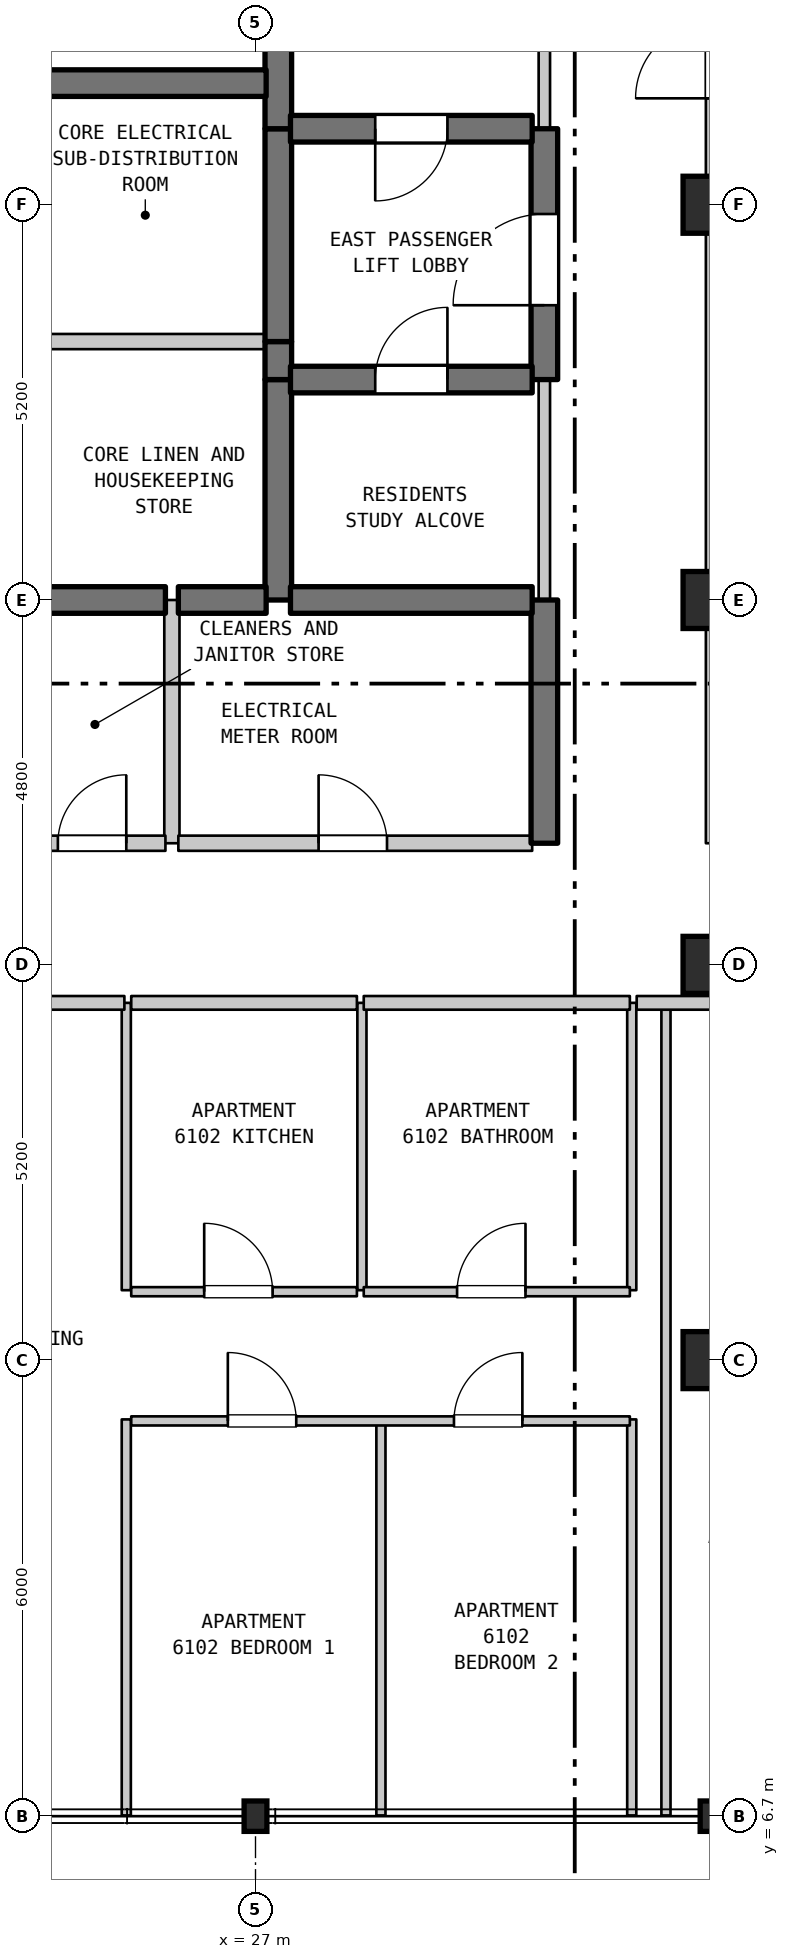
"""IFC4 building model, lengths in metres.
Left out: names, types, materials, properties, quantities, classifications, styles, units other than length and angle.
Written with IfcOpenShell. Run it as: python <this file> out.ifc"""

import sys

from ifc_helpers import new_model, si_unit, direction, frame, frame_2d, origin, origin_2d, place, context, subcontext, project, spatial, rectangle, i_section, extrude, element, fill, save


model = new_model("IFC4")
c1 = context("Model", 3, precision=1e-05, world=origin(), true_north=direction((0.0, 1.0)))
c2 = subcontext(c1, "Body", "Model", "MODEL_VIEW")
j1 = project(units=[si_unit("LENGTHUNIT", "METRE"), si_unit("PLANEANGLEUNIT", "RADIAN")], contexts=[c1])
p1 = place(None, origin())
s1 = spatial("IfcSite", under=j1, at=p1, CompositionType="ELEMENT")
p2 = place(p1, origin())
s2 = spatial("IfcBuilding", under=s1, at=p2, CompositionType="ELEMENT")
p3 = place(p2, frame((0.0, 0.0, 247.3)))
s3 = spatial("IfcBuildingStorey", under=s2, at=p3, CompositionType="ELEMENT", Elevation=247.3)
for number, where, z_axis, x_axis in (
    (1, (27.0, 6.7, 0.0), (0.0, 0.0, 1.0), (1.0, 0.0, 0.0)),
    (2, (33.0, 6.7, 0.0), (0.0, 0.0, 1.0), (1.0, 0.0, 0.0)),
):
    element("IfcColumn", number, at=place(p3, frame(where, z_axis=z_axis, x_axis=x_axis)), inside=s3, PredefinedType="COLUMN", context=c2, shape_type="SweptSolid", body=[
        extrude(i_section(OverallWidth=0.3, OverallDepth=0.4, WebThickness=0.013, FlangeThickness=0.024, FilletRadius=0.027, at=origin_2d()), origin(), (0.0, 0.0, 1.0), 3.7),
    ])
for number, where, z_axis, x_axis in (
    (3, (33.0, 12.7, 0.0), (0.0, 0.0, 1.0), (1.0, 0.0, 0.0)),
    (4, (33.0, 17.9, 0.0), (0.0, 0.0, 1.0), (1.0, 0.0, 0.0)),
    (5, (33.0, 22.7, 0.0), (0.0, 0.0, 1.0), (1.0, 0.0, 0.0)),
    (6, (33.0, 27.9, 0.0), (0.0, 0.0, 1.0), (1.0, 0.0, 0.0)),
):
    element("IfcColumn", number, at=place(p3, frame(where, z_axis=z_axis, x_axis=x_axis)), inside=s3, PredefinedType="COLUMN", context=c2, shape_type="SweptSolid", body=[
        extrude(rectangle(XDim=0.75, YDim=0.75, at=origin_2d()), origin(), (0.0, 0.0, 1.0), 3.7),
    ])
p4 = place(p3, frame((25.3, 6.71, 0.0), z_axis=(0.0, 0.0, 1.0), x_axis=(0.0, 1.0, 0.0)))
e7 = element("IfcWall", 7, at=p4, inside=s3, PredefinedType="PARTITIONING", context=c2, shape_type="SweptSolid", body=[
    extrude(rectangle(XDim=5.21, YDim=0.12, at=frame_2d((2.605, 0.0))), origin(), (0.0, 0.0, 1.0), 3.39),
])
p5 = place(p3, frame((25.3, 13.62, 0.0), z_axis=(0.0, 0.0, 1.0), x_axis=(0.0, 1.0, 0.0)))
e8 = element("IfcWall", 8, at=p5, inside=s3, PredefinedType="PARTITIONING", context=c2, shape_type="SweptSolid", body=[
    extrude(rectangle(XDim=3.78, YDim=0.12, at=frame_2d((1.89, 0.0))), origin(), (0.0, 0.0, 1.0), 3.39),
])
p6 = place(p3, frame((25.9, 19.5, 0.0), z_axis=(0.0, 0.0, 1.0), x_axis=(0.0, 1.0, 0.0)))
e9 = element("IfcWall", 9, at=p6, inside=s3, PredefinedType="STANDARD", context=c2, shape_type="SweptSolid", body=[
    extrude(rectangle(XDim=3.2, YDim=0.2, at=frame_2d((1.6, 0.0))), origin(), (0.0, 0.0, 1.0), 3.39),
])
p7 = place(p3, frame((27.3, 22.7, 0.0), z_axis=(0.0, 0.0, 1.0), x_axis=(0.0, 1.0, 0.0)))
e10 = element("IfcWall", 10, at=p7, inside=s3, PredefinedType="SHEAR", context=c2, shape_type="SweptSolid", body=[
    extrude(rectangle(XDim=2.9, YDim=0.35, at=frame_2d((1.45, 0.0))), origin(), (0.0, 0.0, 1.0), 3.39),
])
p8 = place(p3, frame((27.3, 25.6, 0.0), z_axis=(0.0, 0.0, 1.0), x_axis=(0.0, 1.0, 0.0)))
e11 = element("IfcWall", 11, at=p8, inside=s3, PredefinedType="SHEAR", context=c2, shape_type="SweptSolid", body=[
    extrude(rectangle(XDim=0.5, YDim=0.35, at=frame_2d((0.25, 0.0))), origin(), (0.0, 0.0, 1.0), 3.39),
])
p9 = place(p3, frame((27.3, 26.1, 0.0), z_axis=(0.0, 0.0, 1.0), x_axis=(0.0, 1.0, 0.0)))
e12 = element("IfcWall", 12, at=p9, inside=s3, PredefinedType="SHEAR", context=c2, shape_type="SweptSolid", body=[
    extrude(rectangle(XDim=2.8, YDim=0.35, at=frame_2d((1.4, 0.0))), origin(), (0.0, 0.0, 1.0), 3.39),
])
p10 = place(p3, frame((27.3, 28.9, 0.0), z_axis=(0.0, 0.0, 1.0), x_axis=(0.0, 1.0, 0.0)))
e13 = element("IfcWall", 13, at=p10, inside=s3, PredefinedType="SHEAR", context=c2, shape_type="SweptSolid", body=[
    extrude(rectangle(XDim=2.6, YDim=0.35, at=frame_2d((1.3, 0.0))), origin(), (0.0, 0.0, 1.0), 3.39),
])
p11 = place(p3, frame((28.4, 13.62, 0.0), z_axis=(0.0, 0.0, 1.0), x_axis=(0.0, 1.0, 0.0)))
e14 = element("IfcWall", 14, at=p11, inside=s3, PredefinedType="PARTITIONING", context=c2, shape_type="SweptSolid", body=[
    extrude(rectangle(XDim=3.78, YDim=0.12, at=frame_2d((1.89, 0.0))), origin(), (0.0, 0.0, 1.0), 3.39),
])
p12 = place(p3, frame((28.65, 6.71, 0.0), z_axis=(0.0, 0.0, 1.0), x_axis=(0.0, 1.0, 0.0)))
e15 = element("IfcWall", 15, at=p12, inside=s3, PredefinedType="PARTITIONING", context=c2, shape_type="SweptSolid", body=[
    extrude(rectangle(XDim=5.21, YDim=0.12, at=frame_2d((2.605, 0.0))), origin(), (0.0, 0.0, 1.0), 3.39),
])
p13 = place(p3, frame((30.8, 19.5, 0.0), z_axis=(0.0, 0.0, 1.0), x_axis=(0.0, 1.0, 0.0)))
e16 = element("IfcWall", 16, at=p13, inside=s3, PredefinedType="SHEAR", context=c2, shape_type="SweptSolid", body=[
    extrude(rectangle(XDim=3.2, YDim=0.35, at=frame_2d((1.6, 0.0))), origin(), (0.0, 0.0, 1.0), 3.39),
])
p14 = place(p3, frame((30.8, 22.7, 0.0), z_axis=(0.0, 0.0, 1.0), x_axis=(0.0, 1.0, 0.0)))
e17 = element("IfcWall", 17, at=p14, inside=s3, PredefinedType="STANDARD", context=c2, shape_type="SweptSolid", body=[
    extrude(rectangle(XDim=2.9, YDim=0.15, at=frame_2d((1.45, 0.0))), origin(), (0.0, 0.0, 1.0), 3.39),
])
p15 = place(p3, frame((30.8, 25.6, 0.0), z_axis=(0.0, 0.0, 1.0), x_axis=(0.0, 1.0, 0.0)))
e18 = element("IfcWall", 18, at=p15, inside=s3, PredefinedType="SHEAR", context=c2, shape_type="SweptSolid", body=[
    extrude(rectangle(XDim=3.3, YDim=0.35, at=frame_2d((1.65, 0.0))), origin(), (0.0, 0.0, 1.0), 3.39),
])
p16 = place(p15, frame((0.978, 0.0, 0.0)))
e19 = element("IfcOpeningElement", 19, at=p16, cuts=e18, PredefinedType="OPENING", context=c2, shape_type="SweptSolid", body=[
    extrude(rectangle(XDim=1.2, YDim=2.2, at=frame_2d((0.6, 1.1))), frame((0.0, 0.185, 0.0), z_axis=(0.0, -1.0, 0.0), x_axis=(1.0, 0.0, 0.0)), (0.0, 0.0, 1.0), 0.37),
])
p17 = place(p3, frame((30.8, 28.9, 0.0), z_axis=(0.0, 0.0, 1.0), x_axis=(0.0, 1.0, 0.0)))
e20 = element("IfcWall", 20, at=p17, inside=s3, PredefinedType="STANDARD", context=c2, shape_type="SweptSolid", body=[
    extrude(rectangle(XDim=2.6, YDim=0.15, at=frame_2d((1.3, 0.0))), origin(), (0.0, 0.0, 1.0), 3.39),
])
p18 = place(p3, frame((31.95, 6.71, 0.0), z_axis=(0.0, 0.0, 1.0), x_axis=(0.0, 1.0, 0.0)))
e21 = element("IfcWall", 21, at=p18, inside=s3, PredefinedType="PARTITIONING", context=c2, shape_type="SweptSolid", body=[
    extrude(rectangle(XDim=5.21, YDim=0.12, at=frame_2d((2.605, 0.0))), origin(), (0.0, 0.0, 1.0), 3.39),
])
p19 = place(p3, frame((31.95, 13.62, 0.0), z_axis=(0.0, 0.0, 1.0), x_axis=(0.0, 1.0, 0.0)))
e22 = element("IfcWall", 22, at=p19, inside=s3, PredefinedType="PARTITIONING", context=c2, shape_type="SweptSolid", body=[
    extrude(rectangle(XDim=3.78, YDim=0.12, at=frame_2d((1.89, 0.0))), origin(), (0.0, 0.0, 1.0), 3.39),
])
p20 = place(p3, frame((32.4, 6.71, 0.0), z_axis=(0.0, 0.0, 1.0), x_axis=(0.0, 1.0, 0.0)))
e23 = element("IfcWall", 23, at=p20, inside=s3, PredefinedType="PARTITIONING", context=c2, shape_type="SweptSolid", body=[
    extrude(rectangle(XDim=10.69, YDim=0.12, at=frame_2d((5.345, 0.0))), origin(), (0.0, 0.0, 1.0), 3.39),
])
p21 = place(p3, frame((33.0, 19.5, 0.0), z_axis=(0.0, 0.0, 1.0), x_axis=(0.0, 1.0, 0.0)))
e24 = element("IfcWall", 24, at=p21, inside=s3, PredefinedType="STANDARD", context=c2, shape_type="SweptSolid", body=[
    extrude(rectangle(XDim=8.4, YDim=0.15, at=frame_2d((4.2, 0.0))), origin(), (0.0, 0.0, 1.0), 3.1),
])
p22 = place(p3, frame((25.365, 11.9, 0.0), z_axis=(0.0, 0.0, 1.0), x_axis=(1.0, 0.0, 0.0)))
e25 = element("IfcWall", 25, at=p22, inside=s3, PredefinedType="PARTITIONING", context=c2, shape_type="SweptSolid", body=[
    extrude(rectangle(XDim=6.56, YDim=0.12, at=frame_2d((3.28, 0.0))), origin(), (0.0, 0.0, 1.0), 3.39),
])
p23 = place(p22, frame((1.271, 0.0, 0.0)))
e26 = element("IfcOpeningElement", 26, at=p23, cuts=e25, PredefinedType="OPENING", context=c2, shape_type="SweptSolid", body=[
    extrude(rectangle(XDim=0.9, YDim=2.15, at=frame_2d((0.45, 1.075))), frame((0.0, 0.07, 0.0), z_axis=(0.0, -1.0, 0.0), x_axis=(1.0, 0.0, 0.0)), (0.0, 0.0, 1.0), 0.14),
])
p24 = place(p22, frame((4.246, 0.0, 0.0)))
e27 = element("IfcOpeningElement", 27, at=p24, cuts=e25, PredefinedType="OPENING", context=c2, shape_type="SweptSolid", body=[
    extrude(rectangle(XDim=0.9, YDim=2.15, at=frame_2d((0.45, 1.075))), frame((0.0, 0.07, 0.0), z_axis=(0.0, -1.0, 0.0), x_axis=(1.0, 0.0, 0.0)), (0.0, 0.0, 1.0), 0.14),
])
p25 = place(p3, frame((25.365, 13.6, 0.0), z_axis=(0.0, 0.0, 1.0), x_axis=(1.0, 0.0, 0.0)))
e28 = element("IfcWall", 28, at=p25, inside=s3, PredefinedType="PARTITIONING", context=c2, shape_type="SweptSolid", body=[
    extrude(rectangle(XDim=2.969, YDim=0.12, at=frame_2d((1.484, 0.0))), origin(), (0.0, 0.0, 1.0), 3.39),
])
p26 = place(p25, frame((0.96, 0.0, 0.0)))
e29 = element("IfcOpeningElement", 29, at=p26, cuts=e28, PredefinedType="OPENING", context=c2, shape_type="SweptSolid", body=[
    extrude(rectangle(XDim=0.9, YDim=2.15, at=frame_2d((0.45, 1.075))), frame((0.0, 0.07, 0.0), z_axis=(0.0, -1.0, 0.0), x_axis=(1.0, 0.0, 0.0)), (0.0, 0.0, 1.0), 0.14),
])
p27 = place(p3, frame((28.424, 13.6, 0.0), z_axis=(0.0, 0.0, 1.0), x_axis=(1.0, 0.0, 0.0)))
e30 = element("IfcWall", 30, at=p27, inside=s3, PredefinedType="PARTITIONING", context=c2, shape_type="SweptSolid", body=[
    extrude(rectangle(XDim=3.501, YDim=0.12, at=frame_2d((1.75, 0.0))), origin(), (0.0, 0.0, 1.0), 3.39),
])
p28 = place(p27, frame((1.228, 0.0, 0.0)))
e31 = element("IfcOpeningElement", 31, at=p28, cuts=e30, PredefinedType="OPENING", context=c2, shape_type="SweptSolid", body=[
    extrude(rectangle(XDim=0.9, YDim=2.1, at=frame_2d((0.45, 1.05))), frame((0.0, 0.07, 0.0), z_axis=(0.0, -1.0, 0.0), x_axis=(1.0, 0.0, 0.0)), (0.0, 0.0, 1.0), 0.14),
])
p29 = place(p3, frame((20.855, 17.4, 0.0), z_axis=(0.0, 0.0, 1.0), x_axis=(1.0, 0.0, 0.0)))
e32 = element("IfcWall", 32, at=p29, inside=s3, PredefinedType="STANDARD", context=c2, shape_type="SweptSolid", body=[
    extrude(rectangle(XDim=4.42, YDim=0.18, at=frame_2d((2.21, 0.0))), origin(), (0.0, 0.0, 1.0), 3.39),
])
p30 = place(p29, frame((1.638, 0.0, 0.0)))
e33 = element("IfcOpeningElement", 33, at=p30, cuts=e32, PredefinedType="OPENING", context=c2, shape_type="SweptSolid", body=[
    extrude(rectangle(XDim=1.0, YDim=2.15, at=frame_2d((0.5, 1.075))), frame((0.0, 0.1, 0.0), z_axis=(0.0, -1.0, 0.0), x_axis=(1.0, 0.0, 0.0)), (0.0, 0.0, 1.0), 0.2),
])
p31 = place(p3, frame((25.365, 17.4, 0.0), z_axis=(0.0, 0.0, 1.0), x_axis=(1.0, 0.0, 0.0)))
e34 = element("IfcWall", 34, at=p31, inside=s3, PredefinedType="STANDARD", context=c2, shape_type="SweptSolid", body=[
    extrude(rectangle(XDim=2.969, YDim=0.18, at=frame_2d((1.484, 0.0))), origin(), (0.0, 0.0, 1.0), 3.39),
])
p32 = place(p3, frame((28.424, 17.4, 0.0), z_axis=(0.0, 0.0, 1.0), x_axis=(1.0, 0.0, 0.0)))
e35 = element("IfcWall", 35, at=p32, inside=s3, PredefinedType="STANDARD", context=c2, shape_type="SweptSolid", body=[
    extrude(rectangle(XDim=3.501, YDim=0.18, at=frame_2d((1.75, 0.0))), origin(), (0.0, 0.0, 1.0), 3.39),
])
p33 = place(p3, frame((32.015, 17.4, 0.0), z_axis=(0.0, 0.0, 1.0), x_axis=(1.0, 0.0, 0.0)))
e36 = element("IfcWall", 36, at=p33, inside=s3, PredefinedType="STANDARD", context=c2, shape_type="SweptSolid", body=[
    extrude(rectangle(XDim=4.64, YDim=0.18, at=frame_2d((2.32, 0.0))), origin(), (0.0, 0.0, 1.0), 3.39),
])
p34 = place(p33, frame((2.02, 0.0, 0.0)))
e37 = element("IfcOpeningElement", 37, at=p34, cuts=e36, PredefinedType="OPENING", context=c2, shape_type="SweptSolid", body=[
    extrude(rectangle(XDim=1.0, YDim=2.15, at=frame_2d((0.5, 1.075))), frame((0.0, 0.1, 0.0), z_axis=(0.0, -1.0, 0.0), x_axis=(1.0, 0.0, 0.0)), (0.0, 0.0, 1.0), 0.2),
])
p35 = place(p3, frame((23.96, 19.5, 0.0), z_axis=(0.0, 0.0, 1.0), x_axis=(1.0, 0.0, 0.0)))
e38 = element("IfcWall", 38, at=p35, inside=s3, PredefinedType="STANDARD", context=c2, shape_type="SweptSolid", body=[
    extrude(rectangle(XDim=1.855, YDim=0.2, at=frame_2d((0.927, 0.0))), origin(), (0.0, 0.0, 1.0), 3.39),
])
p36 = place(p35, frame((0.44, 0.0, 0.0)))
e39 = element("IfcOpeningElement", 39, at=p36, cuts=e38, PredefinedType="OPENING", context=c2, shape_type="SweptSolid", body=[
    extrude(rectangle(XDim=0.9, YDim=2.15, at=frame_2d((0.45, 1.075))), frame((0.0, 0.11, 0.0), z_axis=(0.0, -1.0, 0.0), x_axis=(1.0, 0.0, 0.0)), (0.0, 0.0, 1.0), 0.22),
])
p37 = place(p3, frame((25.985, 19.5, 0.0), z_axis=(0.0, 0.0, 1.0), x_axis=(1.0, 0.0, 0.0)))
e40 = element("IfcWall", 40, at=p37, inside=s3, PredefinedType="STANDARD", context=c2, shape_type="SweptSolid", body=[
    extrude(rectangle(XDim=4.655, YDim=0.2, at=frame_2d((2.327, 0.0))), origin(), (0.0, 0.0, 1.0), 3.39),
])
p38 = place(p37, frame((1.845, 0.0, 0.0)))
e41 = element("IfcOpeningElement", 41, at=p38, cuts=e40, PredefinedType="OPENING", context=c2, shape_type="SweptSolid", body=[
    extrude(rectangle(XDim=0.9, YDim=2.15, at=frame_2d((0.45, 1.075))), frame((0.0, 0.11, 0.0), z_axis=(0.0, -1.0, 0.0), x_axis=(1.0, 0.0, 0.0)), (0.0, 0.0, 1.0), 0.22),
])
p39 = place(p3, frame((23.96, 22.7, 0.0), z_axis=(0.0, 0.0, 1.0), x_axis=(1.0, 0.0, 0.0)))
e42 = element("IfcWall", 42, at=p39, inside=s3, PredefinedType="SHEAR", context=c2, shape_type="SweptSolid", body=[
    extrude(rectangle(XDim=1.855, YDim=0.35, at=frame_2d((0.927, 0.0))), origin(), (0.0, 0.0, 1.0), 3.39),
])
p40 = place(p3, frame((25.985, 22.7, 0.0), z_axis=(0.0, 0.0, 1.0), x_axis=(1.0, 0.0, 0.0)))
e43 = element("IfcWall", 43, at=p40, inside=s3, PredefinedType="SHEAR", context=c2, shape_type="SweptSolid", body=[
    extrude(rectangle(XDim=1.155, YDim=0.35, at=frame_2d((0.577, 0.0))), origin(), (0.0, 0.0, 1.0), 3.39),
])
p41 = place(p3, frame((27.46, 22.7, 0.0), z_axis=(0.0, 0.0, 1.0), x_axis=(1.0, 0.0, 0.0)))
e44 = element("IfcWall", 44, at=p41, inside=s3, PredefinedType="SHEAR", context=c2, shape_type="SweptSolid", body=[
    extrude(rectangle(XDim=3.18, YDim=0.35, at=frame_2d((1.59, 0.0))), origin(), (0.0, 0.0, 1.0), 3.39),
])
p42 = place(p3, frame((27.46, 25.6, 0.0), z_axis=(0.0, 0.0, 1.0), x_axis=(1.0, 0.0, 0.0)))
e45 = element("IfcWall", 45, at=p42, inside=s3, PredefinedType="SHEAR", context=c2, shape_type="SweptSolid", body=[
    extrude(rectangle(XDim=3.18, YDim=0.35, at=frame_2d((1.59, 0.0))), origin(), (0.0, 0.0, 1.0), 3.39),
])
p43 = place(p42, frame((1.115, 0.0, 0.0)))
e46 = element("IfcOpeningElement", 46, at=p43, cuts=e45, PredefinedType="OPENING", context=c2, shape_type="SweptSolid", body=[
    extrude(rectangle(XDim=0.95, YDim=2.15, at=frame_2d((0.475, 1.075))), frame((0.0, 0.185, 0.0), z_axis=(0.0, -1.0, 0.0), x_axis=(1.0, 0.0, 0.0)), (0.0, 0.0, 1.0), 0.37),
])
p44 = place(p3, frame((23.96, 26.1, 0.0), z_axis=(0.0, 0.0, 1.0), x_axis=(1.0, 0.0, 0.0)))
e47 = element("IfcWall", 47, at=p44, inside=s3, PredefinedType="STANDARD", context=c2, shape_type="SweptSolid", body=[
    extrude(rectangle(XDim=3.18, YDim=0.2, at=frame_2d((1.59, 0.0))), origin(), (0.0, 0.0, 1.0), 3.39),
])
p45 = place(p3, frame((27.46, 28.9, 0.0), z_axis=(0.0, 0.0, 1.0), x_axis=(1.0, 0.0, 0.0)))
e48 = element("IfcWall", 48, at=p45, inside=s3, PredefinedType="SHEAR", context=c2, shape_type="SweptSolid", body=[
    extrude(rectangle(XDim=3.18, YDim=0.35, at=frame_2d((1.59, 0.0))), origin(), (0.0, 0.0, 1.0), 3.39),
])
p46 = place(p45, frame((1.115, 0.0, 0.0)))
e49 = element("IfcOpeningElement", 49, at=p46, cuts=e48, PredefinedType="OPENING", context=c2, shape_type="SweptSolid", body=[
    extrude(rectangle(XDim=0.95, YDim=2.15, at=frame_2d((0.475, 1.075))), frame((0.0, 0.185, 0.0), z_axis=(0.0, -1.0, 0.0), x_axis=(1.0, 0.0, 0.0)), (0.0, 0.0, 1.0), 0.37),
])
p47 = place(p3, frame((23.96, 29.5, 0.0), z_axis=(0.0, 0.0, 1.0), x_axis=(1.0, 0.0, 0.0)))
e50 = element("IfcWall", 50, at=p47, inside=s3, PredefinedType="SHEAR", context=c2, shape_type="SweptSolid", body=[
    extrude(rectangle(XDim=3.18, YDim=0.35, at=frame_2d((1.59, 0.0))), origin(), (0.0, 0.0, 1.0), 3.39),
])
p48 = place(p3, frame((33.0, 27.9, 0.0), z_axis=(0.0, 0.0, 1.0), x_axis=(0.0, 1.0, 0.0)))
e51 = element("IfcWall", 51, at=p48, inside=s3, PredefinedType="STANDARD", context=c2, shape_type="SweptSolid", body=[
    extrude(rectangle(XDim=10.0, YDim=0.15, at=frame_2d((5.0, 0.0))), origin(), (0.0, 0.0, 1.0), 2.89),
])
p49 = place(p48, frame((1.4, 0.0, 0.0)))
e52 = element("IfcOpeningElement", 52, at=p49, cuts=e51, PredefinedType="OPENING", context=c2, shape_type="SweptSolid", body=[
    extrude(rectangle(XDim=1.0, YDim=2.15, at=frame_2d((0.5, 1.075))), frame((0.0, 0.085, 0.0), z_axis=(0.0, -1.0, 0.0), x_axis=(1.0, 0.0, 0.0)), (0.0, 0.0, 1.0), 0.17),
])
p50 = place(p16, origin())
e53 = element("IfcDoor", 53, at=p50, inside=s3, OperationType="SINGLE_SWING_LEFT", PredefinedType="DOOR", context=c2, shape_type="SweptSolid", body=[
    extrude(rectangle(XDim=1.2, YDim=2.2, at=frame_2d((0.6, 1.1))), frame((0.0, 0.025, 0.0), z_axis=(0.0, -1.0, 0.0), x_axis=(1.0, 0.0, 0.0)), (0.0, 0.0, 1.0), 0.05),
])
fill(e19, e53)
p51 = place(p23, origin())
e54 = element("IfcDoor", 54, at=p51, inside=s3, OperationType="SINGLE_SWING_LEFT", PredefinedType="DOOR", context=c2, shape_type="SweptSolid", body=[
    extrude(rectangle(XDim=0.9, YDim=2.15, at=frame_2d((0.45, 1.075))), frame((0.0, 0.025, 0.0), z_axis=(0.0, -1.0, 0.0), x_axis=(1.0, 0.0, 0.0)), (0.0, 0.0, 1.0), 0.05),
])
fill(e26, e54)
p52 = place(p24, origin())
e55 = element("IfcDoor", 55, at=p52, inside=s3, OperationType="SINGLE_SWING_RIGHT", PredefinedType="DOOR", context=c2, shape_type="SweptSolid", body=[
    extrude(rectangle(XDim=0.9, YDim=2.15, at=frame_2d((0.45, 1.075))), frame((0.0, 0.025, 0.0), z_axis=(0.0, -1.0, 0.0), x_axis=(1.0, 0.0, 0.0)), (0.0, 0.0, 1.0), 0.05),
])
fill(e27, e55)
p53 = place(p26, origin())
e56 = element("IfcDoor", 56, at=p53, inside=s3, OperationType="SINGLE_SWING_LEFT", PredefinedType="DOOR", context=c2, shape_type="SweptSolid", body=[
    extrude(rectangle(XDim=0.9, YDim=2.15, at=frame_2d((0.45, 1.075))), frame((0.0, 0.025, 0.0), z_axis=(0.0, -1.0, 0.0), x_axis=(1.0, 0.0, 0.0)), (0.0, 0.0, 1.0), 0.05),
])
fill(e29, e56)
p54 = place(p28, origin())
e57 = element("IfcDoor", 57, at=p54, inside=s3, OperationType="SINGLE_SWING_RIGHT", PredefinedType="DOOR", context=c2, shape_type="SweptSolid", body=[
    extrude(rectangle(XDim=0.9, YDim=2.1, at=frame_2d((0.45, 1.05))), frame((0.0, 0.025, 0.0), z_axis=(0.0, -1.0, 0.0), x_axis=(1.0, 0.0, 0.0)), (0.0, 0.0, 1.0), 0.05),
])
fill(e31, e57)
p55 = place(p36, origin())
e58 = element("IfcDoor", 58, at=p55, inside=s3, OperationType="SINGLE_SWING_RIGHT", PredefinedType="DOOR", context=c2, shape_type="SweptSolid", body=[
    extrude(rectangle(XDim=0.9, YDim=2.15, at=frame_2d((0.45, 1.075))), frame((0.0, 0.025, 0.0), z_axis=(0.0, -1.0, 0.0), x_axis=(1.0, 0.0, 0.0)), (0.0, 0.0, 1.0), 0.05),
])
fill(e39, e58)
p56 = place(p38, origin())
e59 = element("IfcDoor", 59, at=p56, inside=s3, OperationType="SINGLE_SWING_LEFT", PredefinedType="DOOR", context=c2, shape_type="SweptSolid", body=[
    extrude(rectangle(XDim=0.9, YDim=2.15, at=frame_2d((0.45, 1.075))), frame((0.0, 0.025, 0.0), z_axis=(0.0, -1.0, 0.0), x_axis=(1.0, 0.0, 0.0)), (0.0, 0.0, 1.0), 0.05),
])
fill(e41, e59)
p57 = place(p43, origin())
e60 = element("IfcDoor", 60, at=p57, inside=s3, OperationType="SINGLE_SWING_RIGHT", PredefinedType="DOOR", context=c2, shape_type="SweptSolid", body=[
    extrude(rectangle(XDim=0.95, YDim=2.15, at=frame_2d((0.475, 1.075))), frame((0.0, 0.025, 0.0), z_axis=(0.0, -1.0, 0.0), x_axis=(1.0, 0.0, 0.0)), (0.0, 0.0, 1.0), 0.05),
])
fill(e46, e60)
p58 = place(p46, frame((0.95, 0.0, 0.0), z_axis=(0.0, 0.0, 1.0), x_axis=(-1.0, 0.0, 0.0)))
e61 = element("IfcDoor", 61, at=p58, inside=s3, OperationType="SINGLE_SWING_LEFT", PredefinedType="DOOR", context=c2, shape_type="SweptSolid", body=[
    extrude(rectangle(XDim=0.95, YDim=2.15, at=frame_2d((0.475, 1.075))), frame((0.0, 0.025, 0.0), z_axis=(0.0, -1.0, 0.0), x_axis=(1.0, 0.0, 0.0)), (0.0, 0.0, 1.0), 0.05),
])
fill(e49, e61)
save(model, sys.argv[1])
